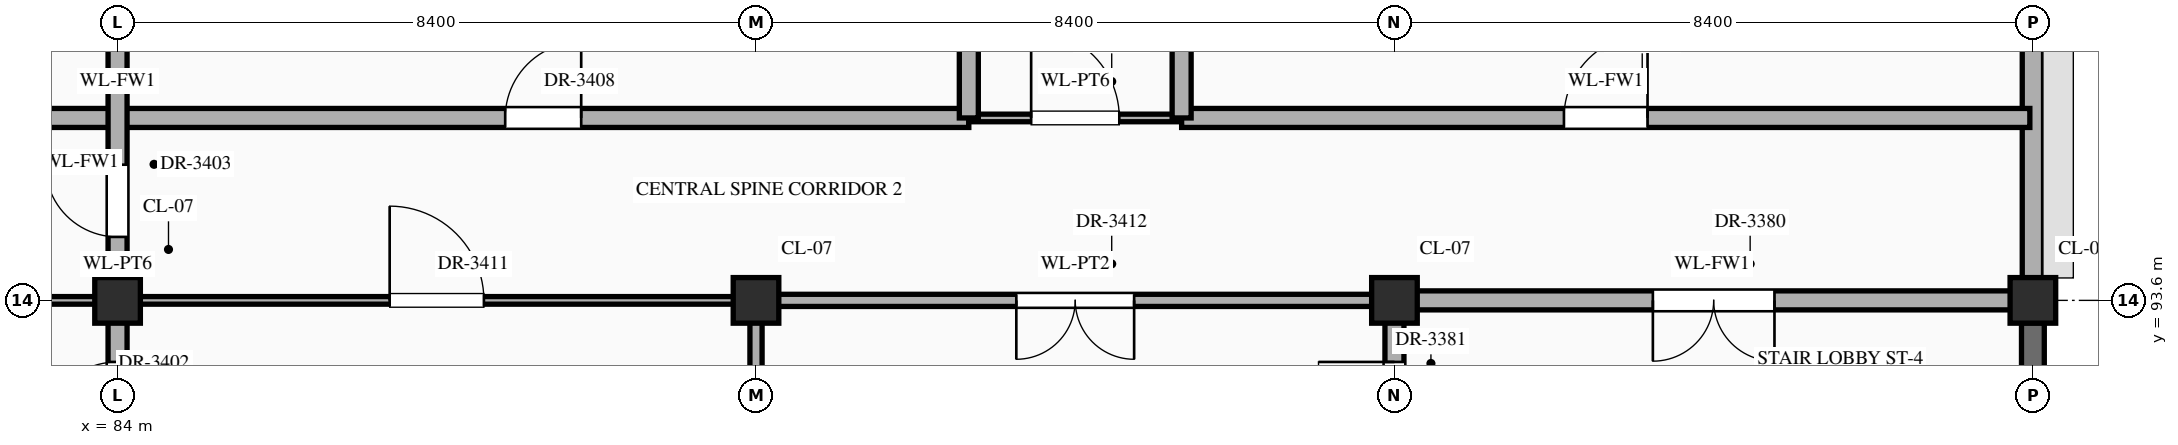
"""IFC4 building model, lengths in metres.
Left out: names, types, materials, properties, quantities, classifications, styles, units other than length and angle.
Written with IfcOpenShell. Run it as: python <this file> out.ifc"""

import sys

from ifc_helpers import new_model, si_unit, direction, frame, frame_2d, origin, origin_2d, place, context, subcontext, project, spatial, rectangle, extrude, element, fill, save


model = new_model("IFC4")
c1 = context("Model", 3, precision=1e-05, world=origin(), true_north=direction((0.0, 1.0)))
c2 = subcontext(c1, "Body", "Model", "MODEL_VIEW")
j1 = project(units=[si_unit("LENGTHUNIT", "METRE"), si_unit("PLANEANGLEUNIT", "RADIAN")], contexts=[c1])
p1 = place(None, origin())
s1 = spatial("IfcSite", under=j1, at=p1, CompositionType="ELEMENT")
p2 = place(p1, origin())
s2 = spatial("IfcBuilding", under=s1, at=p2, CompositionType="ELEMENT")
p3 = place(p2, frame((0.0, 0.0, 68.7)))
s3 = spatial("IfcBuildingStorey", under=s2, at=p3, CompositionType="ELEMENT", Elevation=68.7)
for number, where, z_axis, x_axis in (
    (1, (84.0, 93.6, 0.0), (0.0, 0.0, 1.0), (1.0, 0.0, 0.0)),
    (2, (92.4, 93.6, 0.0), (0.0, 0.0, 1.0), (1.0, 0.0, 0.0)),
    (3, (100.8, 93.6, 0.0), (0.0, 0.0, 1.0), (1.0, 0.0, 0.0)),
    (4, (109.2, 93.6, 0.0), (0.0, 0.0, 1.0), (1.0, 0.0, 0.0)),
):
    element("IfcColumn", number, at=place(p3, frame(where, z_axis=z_axis, x_axis=x_axis)), inside=s3, PredefinedType="COLUMN", context=c2, shape_type="SweptSolid", body=[
        extrude(rectangle(XDim=0.6, YDim=0.6, at=origin_2d()), origin(), (0.0, 0.0, 1.0), 4.5),
    ])
p4 = place(p3, frame((109.2, 86.695, 0.0), z_axis=(0.0, 0.0, 1.0), x_axis=(0.0, 1.0, 0.0)))
e5 = element("IfcWall", 5, at=p4, inside=s3, PredefinedType="SHEAR", context=c2, shape_type="SweptSolid", body=[
    extrude(rectangle(XDim=6.61, YDim=0.3, at=frame_2d((3.305, 0.0))), origin(), (0.0, 0.0, 1.0), 4.12),
])
p5 = place(p3, frame((109.2, 93.895, 0.0), z_axis=(0.0, 0.0, 1.0), x_axis=(0.0, 1.0, 0.0)))
e6 = element("IfcWall", 6, at=p5, inside=s3, PredefinedType="STANDARD", context=c2, shape_type="SweptSolid", body=[
    extrude(rectangle(XDim=6.61, YDim=0.28, at=frame_2d((3.305, 0.0))), origin(), (0.0, 0.0, 1.0), 3.47),
])
p6 = place(p5, frame((4.005, 0.0, 0.85)))
e7 = element("IfcOpeningElement", 7, at=p6, cuts=e6, PredefinedType="OPENING", context=c2, shape_type="SweptSolid", body=[
    extrude(rectangle(XDim=1.2, YDim=1.92, at=frame_2d((0.6, 0.96))), frame((0.0, 0.152, 0.0), z_axis=(0.0, -1.0, 0.0), x_axis=(1.0, 0.0, 0.0)), (0.0, 0.0, 1.0), 0.304),
])
p7 = place(p3, frame((75.6, 93.6, 0.0), z_axis=(0.0, 0.0, 1.0), x_axis=(1.0, 0.0, 0.0)))
e8 = element("IfcWall", 8, at=p7, inside=s3, PredefinedType="STANDARD", context=c2, shape_type="SweptSolid", body=[
    extrude(rectangle(XDim=16.8, YDim=0.1, at=frame_2d((8.4, 0.0))), origin(), (0.0, 0.0, 1.0), 3.27),
])
p8 = place(p7, frame((3.425, 0.0, 0.0)))
e9 = element("IfcOpeningElement", 9, at=p8, cuts=e8, PredefinedType="OPENING", context=c2, shape_type="SweptSolid", body=[
    extrude(rectangle(XDim=1.55, YDim=2.35, at=frame_2d((0.775, 1.175))), frame((0.0, 0.062, 0.0), z_axis=(0.0, -1.0, 0.0), x_axis=(1.0, 0.0, 0.0)), (0.0, 0.0, 1.0), 0.124),
])
p9 = place(p7, frame((11.98, 0.0, 0.0)))
e10 = element("IfcOpeningElement", 10, at=p9, cuts=e8, PredefinedType="OPENING", context=c2, shape_type="SweptSolid", body=[
    extrude(rectangle(XDim=1.24, YDim=2.3, at=frame_2d((0.62, 1.15))), frame((0.0, 0.062, 0.0), z_axis=(0.0, -1.0, 0.0), x_axis=(1.0, 0.0, 0.0)), (0.0, 0.0, 1.0), 0.124),
])
p10 = place(p3, frame((92.4, 93.6, 0.0), z_axis=(0.0, 0.0, 1.0), x_axis=(1.0, 0.0, 0.0)))
e11 = element("IfcWall", 11, at=p10, inside=s3, PredefinedType="STANDARD", context=c2, shape_type="SweptSolid", body=[
    extrude(rectangle(XDim=8.4, YDim=0.16, at=frame_2d((4.2, 0.0))), origin(), (0.0, 0.0, 1.0), 3.27),
])
p11 = place(p10, frame((3.425, 0.0, 0.0)))
e12 = element("IfcOpeningElement", 12, at=p11, cuts=e11, PredefinedType="OPENING", context=c2, shape_type="SweptSolid", body=[
    extrude(rectangle(XDim=1.55, YDim=2.35, at=frame_2d((0.775, 1.175))), frame((0.0, 0.092, 0.0), z_axis=(0.0, -1.0, 0.0), x_axis=(1.0, 0.0, 0.0)), (0.0, 0.0, 1.0), 0.184),
])
p12 = place(p3, frame((100.8, 93.6, 0.0), z_axis=(0.0, 0.0, 1.0), x_axis=(1.0, 0.0, 0.0)))
e13 = element("IfcWall", 13, at=p12, inside=s3, PredefinedType="STANDARD", context=c2, shape_type="SweptSolid", body=[
    extrude(rectangle(XDim=8.36, YDim=0.25, at=frame_2d((4.18, 0.0))), origin(), (0.0, 0.0, 1.0), 3.27),
])
p13 = place(p12, frame((3.4, 0.0, 0.0)))
e14 = element("IfcOpeningElement", 14, at=p13, cuts=e13, PredefinedType="OPENING", context=c2, shape_type="SweptSolid", body=[
    extrude(rectangle(XDim=1.6, YDim=2.3, at=frame_2d((0.8, 1.15))), frame((0.0, 0.137, 0.0), z_axis=(0.0, -1.0, 0.0), x_axis=(1.0, 0.0, 0.0)), (0.0, 0.0, 1.0), 0.274),
])
p14 = place(p3, frame((72.8, 96.0, 0.0), z_axis=(0.0, 0.0, 1.0), x_axis=(1.0, 0.0, 0.0)))
e15 = element("IfcWall", 15, at=p14, inside=s3, PredefinedType="STANDARD", context=c2, shape_type="SweptSolid", body=[
    extrude(rectangle(XDim=22.4, YDim=0.25, at=frame_2d((11.2, 0.0))), origin(), (0.0, 0.0, 1.0), 4.12),
])
p15 = place(p14, frame((5.125, 0.0, 0.0)))
e16 = element("IfcOpeningElement", 16, at=p15, cuts=e15, PredefinedType="OPENING", context=c2, shape_type="SweptSolid", body=[
    extrude(rectangle(XDim=0.95, YDim=2.15, at=frame_2d((0.475, 1.075))), frame((0.0, 0.137, 0.0), z_axis=(0.0, -1.0, 0.0), x_axis=(1.0, 0.0, 0.0)), (0.0, 0.0, 1.0), 0.274),
])
p16 = place(p14, frame((16.3, 0.0, 0.0)))
e17 = element("IfcOpeningElement", 17, at=p16, cuts=e15, PredefinedType="OPENING", context=c2, shape_type="SweptSolid", body=[
    extrude(rectangle(XDim=1.0, YDim=2.2, at=frame_2d((0.5, 1.1))), frame((0.0, 0.137, 0.0), z_axis=(0.0, -1.0, 0.0), x_axis=(1.0, 0.0, 0.0)), (0.0, 0.0, 1.0), 0.274),
])
p17 = place(p3, frame((95.2, 96.0, 0.0), z_axis=(0.0, 0.0, 1.0), x_axis=(1.0, 0.0, 0.0)))
e18 = element("IfcWall", 18, at=p17, inside=s3, PredefinedType="STANDARD", context=c2, shape_type="SweptSolid", body=[
    extrude(rectangle(XDim=2.8, YDim=0.1, at=frame_2d((1.4, 0.0))), origin(), (0.0, 0.0, 1.0), 4.12),
])
p18 = place(p17, frame((0.82, 0.0, 0.0)))
e19 = element("IfcOpeningElement", 19, at=p18, cuts=e18, PredefinedType="OPENING", context=c2, shape_type="SweptSolid", body=[
    extrude(rectangle(XDim=1.16, YDim=2.3, at=frame_2d((0.58, 1.15))), frame((0.0, 0.062, 0.0), z_axis=(0.0, -1.0, 0.0), x_axis=(1.0, 0.0, 0.0)), (0.0, 0.0, 1.0), 0.124),
])
p19 = place(p3, frame((98.0, 96.0, 0.0), z_axis=(0.0, 0.0, 1.0), x_axis=(1.0, 0.0, 0.0)))
e20 = element("IfcWall", 20, at=p19, inside=s3, PredefinedType="STANDARD", context=c2, shape_type="SweptSolid", body=[
    extrude(rectangle(XDim=11.16, YDim=0.25, at=frame_2d((5.58, 0.0))), origin(), (0.0, 0.0, 1.0), 4.12),
])
p20 = place(p19, frame((5.03, 0.0, 0.0)))
e21 = element("IfcOpeningElement", 21, at=p20, cuts=e20, PredefinedType="OPENING", context=c2, shape_type="SweptSolid", body=[
    extrude(rectangle(XDim=1.1, YDim=2.2, at=frame_2d((0.55, 1.1))), frame((0.0, 0.137, 0.0), z_axis=(0.0, -1.0, 0.0), x_axis=(1.0, 0.0, 0.0)), (0.0, 0.0, 1.0), 0.274),
])
p21 = place(p3, frame((84.0, 86.44, 0.0), z_axis=(0.0, 0.0, 1.0), x_axis=(0.0, 1.0, 0.0)))
e22 = element("IfcWall", 22, at=p21, inside=s3, PredefinedType="STANDARD", context=c2, shape_type="SweptSolid", body=[
    extrude(rectangle(XDim=17.96, YDim=0.25, at=frame_2d((8.98, 0.0))), origin(), (0.0, 0.0, 1.0), 3.37),
])
p22 = place(p21, frame((15.52, 0.0, 0.0)))
e23 = element("IfcOpeningElement", 23, at=p22, cuts=e22, PredefinedType="OPENING", context=c2, shape_type="SweptSolid", body=[
    extrude(rectangle(XDim=1.5, YDim=2.25, at=frame_2d((0.75, 1.125))), frame((0.0, 0.137, 0.0), z_axis=(0.0, -1.0, 0.0), x_axis=(1.0, 0.0, 0.0)), (0.0, 0.0, 1.0), 0.274),
])
p23 = place(p21, frame((5.35, 0.0, 0.0)))
e24 = element("IfcOpeningElement", 24, at=p23, cuts=e22, PredefinedType="OPENING", context=c2, shape_type="SweptSolid", body=[
    extrude(rectangle(XDim=1.0, YDim=2.2, at=frame_2d((0.5, 1.1))), frame((0.0, 0.137, 0.0), z_axis=(0.0, -1.0, 0.0), x_axis=(1.0, 0.0, 0.0)), (0.0, 0.0, 1.0), 0.274),
])
p24 = place(p21, frame((7.995, 0.0, 0.0)))
e25 = element("IfcOpeningElement", 25, at=p24, cuts=e22, PredefinedType="OPENING", context=c2, shape_type="SweptSolid", body=[
    extrude(rectangle(XDim=0.95, YDim=2.15, at=frame_2d((0.475, 1.075))), frame((0.0, 0.137, 0.0), z_axis=(0.0, -1.0, 0.0), x_axis=(1.0, 0.0, 0.0)), (0.0, 0.0, 1.0), 0.274),
])
p25 = place(p3, frame((92.4, 86.44, 0.0), z_axis=(0.0, 0.0, 1.0), x_axis=(0.0, 1.0, 0.0)))
e26 = element("IfcWall", 26, at=p25, inside=s3, PredefinedType="STANDARD", context=c2, shape_type="SweptSolid", body=[
    extrude(rectangle(XDim=7.16, YDim=0.16, at=frame_2d((3.58, 0.0))), origin(), (0.0, 0.0, 1.0), 3.37),
])
p26 = place(p25, frame((2.735, 0.0, 0.0)))
e27 = element("IfcOpeningElement", 27, at=p26, cuts=e26, PredefinedType="OPENING", context=c2, shape_type="SweptSolid", body=[
    extrude(rectangle(XDim=1.65, YDim=2.4, at=frame_2d((0.825, 1.2))), frame((0.0, 0.092, 0.0), z_axis=(0.0, -1.0, 0.0), x_axis=(1.0, 0.0, 0.0)), (0.0, 0.0, 1.0), 0.184),
])
p27 = place(p3, frame((95.2, 96.0, 0.0), z_axis=(0.0, 0.0, 1.0), x_axis=(0.0, 1.0, 0.0)))
e28 = element("IfcWall", 28, at=p27, inside=s3, PredefinedType="STANDARD", context=c2, shape_type="SweptSolid", body=[
    extrude(rectangle(XDim=4.8, YDim=0.25, at=frame_2d((2.4, 0.0))), origin(), (0.0, 0.0, 1.0), 4.12),
])
p28 = place(p27, frame((1.925, 0.0, 0.0)))
e29 = element("IfcOpeningElement", 29, at=p28, cuts=e28, PredefinedType="OPENING", context=c2, shape_type="SweptSolid", body=[
    extrude(rectangle(XDim=0.95, YDim=2.15, at=frame_2d((0.475, 1.075))), frame((0.0, 0.137, 0.0), z_axis=(0.0, -1.0, 0.0), x_axis=(1.0, 0.0, 0.0)), (0.0, 0.0, 1.0), 0.274),
])
p29 = place(p3, frame((98.0, 96.0, 0.0), z_axis=(0.0, 0.0, 1.0), x_axis=(0.0, 1.0, 0.0)))
e30 = element("IfcWall", 30, at=p29, inside=s3, PredefinedType="STANDARD", context=c2, shape_type="SweptSolid", body=[
    extrude(rectangle(XDim=4.8, YDim=0.25, at=frame_2d((2.4, 0.0))), origin(), (0.0, 0.0, 1.0), 4.12),
])
p30 = place(p29, frame((1.85, 0.0, 0.0)))
e31 = element("IfcOpeningElement", 31, at=p30, cuts=e30, PredefinedType="OPENING", context=c2, shape_type="SweptSolid", body=[
    extrude(rectangle(XDim=1.1, YDim=2.2, at=frame_2d((0.55, 1.1))), frame((0.0, 0.137, 0.0), z_axis=(0.0, -1.0, 0.0), x_axis=(1.0, 0.0, 0.0)), (0.0, 0.0, 1.0), 0.274),
])
p31 = place(p3, frame((100.8, 91.2, 0.0), z_axis=(0.0, 0.0, 1.0), x_axis=(0.0, 1.0, 0.0)))
e32 = element("IfcWall", 32, at=p31, inside=s3, PredefinedType="STANDARD", context=c2, shape_type="SweptSolid", body=[
    extrude(rectangle(XDim=2.4, YDim=0.25, at=frame_2d((1.2, 0.0))), origin(), (0.0, 0.0, 1.0), 3.37),
])
p32 = place(p31, frame((0.59, 0.0, 0.0)))
e33 = element("IfcOpeningElement", 33, at=p32, cuts=e32, PredefinedType="OPENING", context=c2, shape_type="SweptSolid", body=[
    extrude(rectangle(XDim=1.0, YDim=2.2, at=frame_2d((0.5, 1.1))), frame((0.0, 0.137, 0.0), z_axis=(0.0, -1.0, 0.0), x_axis=(1.0, 0.0, 0.0)), (0.0, 0.0, 1.0), 0.274),
])
p33 = place(p13, frame((1.6, 0.0, 0.0), z_axis=(0.0, 0.0, 1.0), x_axis=(-1.0, 0.0, 0.0)))
e34 = element("IfcDoor", 34, at=p33, inside=s3, OperationType="DOUBLE_DOOR_SINGLE_SWING", PredefinedType="DOOR", context=c2, shape_type="SweptSolid", body=[
    extrude(rectangle(XDim=1.6, YDim=2.3, at=frame_2d((0.8, 1.15))), frame((0.0, 0.025, 0.0), z_axis=(0.0, -1.0, 0.0), x_axis=(1.0, 0.0, 0.0)), (0.0, 0.0, 1.0), 0.05),
])
fill(e14, e34)
p34 = place(p32, origin())
e35 = element("IfcDoor", 35, at=p34, inside=s3, OperationType="SINGLE_SWING_RIGHT", PredefinedType="DOOR", context=c2, shape_type="SweptSolid", body=[
    extrude(rectangle(XDim=1.0, YDim=2.2, at=frame_2d((0.5, 1.1))), frame((0.0, 0.025, 0.0), z_axis=(0.0, -1.0, 0.0), x_axis=(1.0, 0.0, 0.0)), (0.0, 0.0, 1.0), 0.05),
])
fill(e33, e35)
p35 = place(p23, origin())
e36 = element("IfcDoor", 36, at=p35, inside=s3, OperationType="SINGLE_SWING_LEFT", PredefinedType="DOOR", context=c2, shape_type="SweptSolid", body=[
    extrude(rectangle(XDim=1.0, YDim=2.2, at=frame_2d((0.5, 1.1))), frame((0.0, 0.025, 0.0), z_axis=(0.0, -1.0, 0.0), x_axis=(1.0, 0.0, 0.0)), (0.0, 0.0, 1.0), 0.05),
])
fill(e24, e36)
p36 = place(p24, origin())
e37 = element("IfcDoor", 37, at=p36, inside=s3, OperationType="SINGLE_SWING_RIGHT", PredefinedType="DOOR", context=c2, shape_type="SweptSolid", body=[
    extrude(rectangle(XDim=0.95, YDim=2.15, at=frame_2d((0.475, 1.075))), frame((0.0, 0.025, 0.0), z_axis=(0.0, -1.0, 0.0), x_axis=(1.0, 0.0, 0.0)), (0.0, 0.0, 1.0), 0.05),
])
fill(e25, e37)
p37 = place(p16, origin())
e38 = element("IfcDoor", 38, at=p37, inside=s3, OperationType="SINGLE_SWING_RIGHT", PredefinedType="DOOR", context=c2, shape_type="SweptSolid", body=[
    extrude(rectangle(XDim=1.0, YDim=2.2, at=frame_2d((0.5, 1.1))), frame((0.0, 0.025, 0.0), z_axis=(0.0, -1.0, 0.0), x_axis=(1.0, 0.0, 0.0)), (0.0, 0.0, 1.0), 0.05),
])
fill(e17, e38)
p38 = place(p18, origin())
e39 = element("IfcDoor", 39, at=p38, inside=s3, OperationType="SINGLE_SWING_LEFT", PredefinedType="DOOR", context=c2, shape_type="SweptSolid", body=[
    extrude(rectangle(XDim=1.16, YDim=2.3, at=frame_2d((0.58, 1.15))), frame((0.0, 0.025, 0.0), z_axis=(0.0, -1.0, 0.0), x_axis=(1.0, 0.0, 0.0)), (0.0, 0.0, 1.0), 0.05),
])
fill(e19, e39)
p39 = place(p20, origin())
e40 = element("IfcDoor", 40, at=p39, inside=s3, OperationType="SINGLE_SWING_RIGHT", PredefinedType="DOOR", context=c2, shape_type="SweptSolid", body=[
    extrude(rectangle(XDim=1.1, YDim=2.2, at=frame_2d((0.55, 1.1))), frame((0.0, 0.025, 0.0), z_axis=(0.0, -1.0, 0.0), x_axis=(1.0, 0.0, 0.0)), (0.0, 0.0, 1.0), 0.05),
])
fill(e21, e40)
p40 = place(p9, origin())
e41 = element("IfcDoor", 41, at=p40, inside=s3, OperationType="SINGLE_SWING_LEFT", PredefinedType="DOOR", context=c2, shape_type="SweptSolid", body=[
    extrude(rectangle(XDim=1.24, YDim=2.3, at=frame_2d((0.62, 1.15))), frame((0.0, 0.025, 0.0), z_axis=(0.0, -1.0, 0.0), x_axis=(1.0, 0.0, 0.0)), (0.0, 0.0, 1.0), 0.05),
])
fill(e10, e41)
p41 = place(p11, frame((1.55, 0.0, 0.0), z_axis=(0.0, 0.0, 1.0), x_axis=(-1.0, 0.0, 0.0)))
e42 = element("IfcDoor", 42, at=p41, inside=s3, OperationType="DOUBLE_DOOR_SINGLE_SWING", PredefinedType="DOOR", context=c2, shape_type="SweptSolid", body=[
    extrude(rectangle(XDim=1.55, YDim=2.35, at=frame_2d((0.775, 1.175))), frame((0.0, 0.025, 0.0), z_axis=(0.0, -1.0, 0.0), x_axis=(1.0, 0.0, 0.0)), (0.0, 0.0, 1.0), 0.05),
])
fill(e12, e42)
save(model, sys.argv[1])
